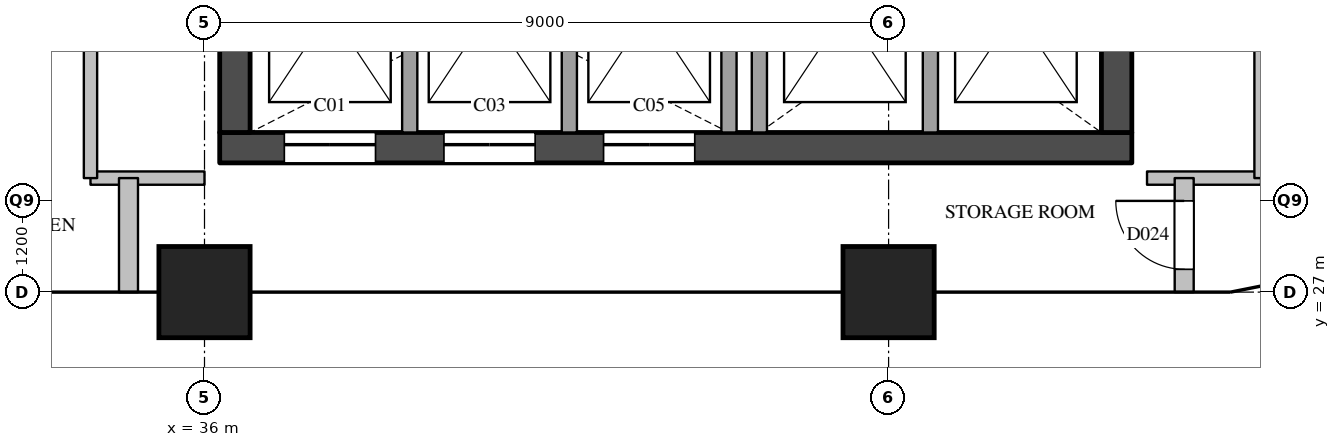
"""IFC4 building model, lengths in metres.
Left out: names, types, materials, properties, quantities, classifications, styles, units other than length and angle.
Written with IfcOpenShell. Run it as: python <this file> out.ifc"""

import sys

from ifc_helpers import new_model, si_unit, direction, frame, frame_2d, origin, origin_2d, place, context, subcontext, project, spatial, rectangle, extrude, element, fill, save


model = new_model("IFC4")
c1 = context("Model", 3, precision=1e-05, world=origin(), true_north=direction((0.0, 1.0)))
c2 = subcontext(c1, "Body", "Model", "MODEL_VIEW")
j1 = project(units=[si_unit("LENGTHUNIT", "METRE"), si_unit("PLANEANGLEUNIT", "RADIAN")], contexts=[c1])
p1 = place(None, origin())
s1 = spatial("IfcSite", under=j1, at=p1, CompositionType="ELEMENT")
p2 = place(p1, origin())
s2 = spatial("IfcBuilding", under=s1, at=p2, CompositionType="ELEMENT")
p3 = place(p2, frame((0.0, 0.0, 238.4)))
s3 = spatial("IfcBuildingStorey", under=s2, at=p3, CompositionType="ELEMENT", Elevation=238.4)
for number, where, z_axis, x_axis in (
    (1, (36.0, 27.0, 0.0), (0.0, 0.0, 1.0), (1.0, 0.0, 0.0)),
    (2, (45.0, 27.0, 0.0), (0.0, 0.0, 1.0), (1.0, 0.0, 0.0)),
):
    element("IfcColumn", number, at=place(p3, frame(where, z_axis=z_axis, x_axis=x_axis)), inside=s3, PredefinedType="COLUMN", context=c2, shape_type="SweptSolid", body=[
        extrude(rectangle(XDim=1.2, YDim=1.2, at=origin_2d()), origin(), (0.0, 0.0, 1.0), 3.9),
    ])
p4 = place(p3, frame((36.2, 28.9, 0.0), z_axis=(0.0, 0.0, 1.0), x_axis=(1.0, 0.0, 0.0)))
e3 = element("IfcWall", 3, at=p4, inside=s3, PredefinedType="SHEAR", context=c2, shape_type="SweptSolid", body=[
    extrude(rectangle(XDim=12.0, YDim=0.4, at=frame_2d((6.0, 0.0))), origin(), (0.0, 0.0, 1.0), 3.6),
])
p5 = place(p4, frame((0.85, 0.0, 0.0)))
e4 = element("IfcOpeningElement", 4, at=p5, cuts=e3, PredefinedType="OPENING", context=c2, shape_type="SweptSolid", body=[
    extrude(rectangle(XDim=1.2, YDim=2.1, at=frame_2d((0.6, 1.05))), frame((0.0, 0.21, 0.0), z_axis=(0.0, -1.0, 0.0), x_axis=(1.0, 0.0, 0.0)), (0.0, 0.0, 1.0), 0.42),
])
p6 = place(p4, frame((2.95, 0.0, 0.0)))
e5 = element("IfcOpeningElement", 5, at=p6, cuts=e3, PredefinedType="OPENING", context=c2, shape_type="SweptSolid", body=[
    extrude(rectangle(XDim=1.2, YDim=2.1, at=frame_2d((0.6, 1.05))), frame((0.0, 0.21, 0.0), z_axis=(0.0, -1.0, 0.0), x_axis=(1.0, 0.0, 0.0)), (0.0, 0.0, 1.0), 0.42),
])
p7 = place(p4, frame((5.05, 0.0, 0.0)))
e6 = element("IfcOpeningElement", 6, at=p7, cuts=e3, PredefinedType="OPENING", context=c2, shape_type="SweptSolid", body=[
    extrude(rectangle(XDim=1.2, YDim=2.1, at=frame_2d((0.6, 1.05))), frame((0.0, 0.21, 0.0), z_axis=(0.0, -1.0, 0.0), x_axis=(1.0, 0.0, 0.0)), (0.0, 0.0, 1.0), 0.42),
])
p8 = place(p3, frame((36.4, 29.1, 0.0), z_axis=(0.0, 0.0, 1.0), x_axis=(0.0, 1.0, 0.0)))
e7 = element("IfcWall", 7, at=p8, inside=s3, PredefinedType="SHEAR", context=c2, shape_type="SweptSolid", body=[
    extrude(rectangle(XDim=20.3, YDim=0.4, at=frame_2d((10.15, 0.0))), origin(), (0.0, 0.0, 1.0), 3.6),
])
p9 = place(p8, frame((3.6, 0.0, 0.0)))
e8 = element("IfcOpeningElement", 8, at=p9, cuts=e7, PredefinedType="OPENING", context=c2, shape_type="SweptSolid", body=[
    extrude(rectangle(XDim=1.8, YDim=2.1, at=frame_2d((0.9, 1.05))), frame((0.0, 0.21, 0.0), z_axis=(0.0, -1.0, 0.0), x_axis=(1.0, 0.0, 0.0)), (0.0, 0.0, 1.0), 0.42),
])
p10 = place(p8, frame((16.4, 0.0, 0.0)))
e9 = element("IfcOpeningElement", 9, at=p10, cuts=e7, PredefinedType="OPENING", context=c2, shape_type="SweptSolid", body=[
    extrude(rectangle(XDim=1.0, YDim=2.1, at=frame_2d((0.5, 1.05))), frame((0.0, 0.21, 0.0), z_axis=(0.0, -1.0, 0.0), x_axis=(1.0, 0.0, 0.0)), (0.0, 0.0, 1.0), 0.42),
])
p11 = place(p3, frame((48.0, 29.1, 0.0), z_axis=(0.0, 0.0, 1.0), x_axis=(0.0, 1.0, 0.0)))
e10 = element("IfcWall", 10, at=p11, inside=s3, PredefinedType="SHEAR", context=c2, shape_type="SweptSolid", body=[
    extrude(rectangle(XDim=20.3, YDim=0.4, at=frame_2d((10.15, 0.0))), origin(), (0.0, 0.0, 1.0), 3.6),
])
p12 = place(p11, frame((12.5, 0.0, 0.0)))
e11 = element("IfcOpeningElement", 11, at=p12, cuts=e10, PredefinedType="OPENING", context=c2, shape_type="SweptSolid", body=[
    extrude(rectangle(XDim=0.7, YDim=2.1, at=frame_2d((0.35, 1.05))), frame((0.0, 0.21, 0.0), z_axis=(0.0, -1.0, 0.0), x_axis=(1.0, 0.0, 0.0)), (0.0, 0.0, 1.0), 0.42),
])
p13 = place(p11, frame((3.9, 0.0, 0.0)))
e12 = element("IfcOpeningElement", 12, at=p13, cuts=e10, PredefinedType="OPENING", context=c2, shape_type="SweptSolid", body=[
    extrude(rectangle(XDim=1.8, YDim=2.1, at=frame_2d((0.9, 1.05))), frame((0.0, 0.21, 0.0), z_axis=(0.0, -1.0, 0.0), x_axis=(1.0, 0.0, 0.0)), (0.0, 0.0, 1.0), 0.42),
])
for number, where, z_axis, x_axis in (
    (13, (38.7, 29.1, 0.0), (0.0, 0.0, 1.0), (0.0, 1.0, 0.0)),
    (14, (40.8, 29.1, 0.0), (0.0, 0.0, 1.0), (0.0, 1.0, 0.0)),
    (15, (42.9, 29.1, 0.0), (0.0, 0.0, 1.0), (0.0, 1.0, 0.0)),
):
    element("IfcWall", number, at=place(p3, frame(where, z_axis=z_axis, x_axis=x_axis)), inside=s3, PredefinedType="SOLIDWALL", context=c2, shape_type="SweptSolid", body=[
        extrude(rectangle(XDim=3.2, YDim=0.2, at=frame_2d((1.6, 0.0))), origin(), (0.0, 0.0, 1.0), 3.6),
    ])
p14 = place(p3, frame((43.3, 29.1, 0.0), z_axis=(0.0, 0.0, 1.0), x_axis=(0.0, 1.0, 0.0)))
e16 = element("IfcWall", 16, at=p14, inside=s3, PredefinedType="SOLIDWALL", context=c2, shape_type="SweptSolid", body=[
    extrude(rectangle(XDim=9.9, YDim=0.2, at=frame_2d((4.95, 0.0))), origin(), (0.0, 0.0, 1.0), 3.6),
])
p15 = place(p3, frame((45.55, 29.1, 0.0), z_axis=(0.0, 0.0, 1.0), x_axis=(0.0, 1.0, 0.0)))
e17 = element("IfcWall", 17, at=p15, inside=s3, PredefinedType="SOLIDWALL", context=c2, shape_type="SweptSolid", body=[
    extrude(rectangle(XDim=3.2, YDim=0.2, at=frame_2d((1.6, 0.0))), origin(), (0.0, 0.0, 1.0), 3.6),
])
for number, where, z_axis, x_axis in (
    (18, (34.5, 28.5, 0.0), (0.0, 0.0, 1.0), (1.0, 0.0, 0.0)),
    (19, (48.4, 28.5, 0.0), (0.0, 0.0, 1.0), (1.0, 0.0, 0.0)),
):
    element("IfcWall", number, at=place(p3, frame(where, z_axis=z_axis, x_axis=x_axis)), inside=s3, PredefinedType="PARTITIONING", context=c2, shape_type="SweptSolid", body=[
        extrude(rectangle(XDim=1.5, YDim=0.175, at=frame_2d((0.75, 0.0))), origin(), (0.0, 0.0, 1.0), 3.6),
    ])
p16 = place(p3, frame((34.5, 28.5, 0.0), z_axis=(0.0, 0.0, 1.0), x_axis=(0.0, 1.0, 0.0)))
e20 = element("IfcWall", 20, at=p16, inside=s3, PredefinedType="PARTITIONING", context=c2, shape_type="SweptSolid", body=[
    extrude(rectangle(XDim=23.0, YDim=0.175, at=frame_2d((11.5, 0.0))), origin(), (0.0, 0.0, 1.0), 3.6),
])
p17 = place(p16, frame((5.1, 0.0, 0.0)))
e21 = element("IfcOpeningElement", 21, at=p17, cuts=e20, PredefinedType="OPENING", context=c2, shape_type="SweptSolid", body=[
    extrude(rectangle(XDim=1.0, YDim=2.1, at=frame_2d((0.5, 1.05))), frame((0.0, 0.097, 0.0), z_axis=(0.0, -1.0, 0.0), x_axis=(1.0, 0.0, 0.0)), (0.0, 0.0, 1.0), 0.195),
])
p18 = place(p16, frame((6.9, 0.0, 0.0)))
e22 = element("IfcOpeningElement", 22, at=p18, cuts=e20, PredefinedType="OPENING", context=c2, shape_type="SweptSolid", body=[
    extrude(rectangle(XDim=1.0, YDim=2.1, at=frame_2d((0.5, 1.05))), frame((0.0, 0.097, 0.0), z_axis=(0.0, -1.0, 0.0), x_axis=(1.0, 0.0, 0.0)), (0.0, 0.0, 1.0), 0.195),
])
p19 = place(p16, frame((16.9, 0.0, 0.0)))
e23 = element("IfcOpeningElement", 23, at=p19, cuts=e20, PredefinedType="OPENING", context=c2, shape_type="SweptSolid", body=[
    extrude(rectangle(XDim=1.0, YDim=2.1, at=frame_2d((0.5, 1.05))), frame((0.0, 0.097, 0.0), z_axis=(0.0, -1.0, 0.0), x_axis=(1.0, 0.0, 0.0)), (0.0, 0.0, 1.0), 0.195),
])
p20 = place(p3, frame((49.9, 28.5, 0.0), z_axis=(0.0, 0.0, 1.0), x_axis=(0.0, 1.0, 0.0)))
e24 = element("IfcWall", 24, at=p20, inside=s3, PredefinedType="PARTITIONING", context=c2, shape_type="SweptSolid", body=[
    extrude(rectangle(XDim=23.0, YDim=0.175, at=frame_2d((11.5, 0.0))), origin(), (0.0, 0.0, 1.0), 3.6),
])
p21 = place(p20, frame((5.3, 0.0, 0.0)))
e25 = element("IfcOpeningElement", 25, at=p21, cuts=e24, PredefinedType="OPENING", context=c2, shape_type="SweptSolid", body=[
    extrude(rectangle(XDim=0.9, YDim=2.1, at=frame_2d((0.45, 1.05))), frame((0.0, 0.097, 0.0), z_axis=(0.0, -1.0, 0.0), x_axis=(1.0, 0.0, 0.0)), (0.0, 0.0, 1.0), 0.195),
])
p22 = place(p20, frame((16.05, 0.0, 0.0)))
e26 = element("IfcOpeningElement", 26, at=p22, cuts=e24, PredefinedType="OPENING", context=c2, shape_type="SweptSolid", body=[
    extrude(rectangle(XDim=0.9, YDim=2.1, at=frame_2d((0.45, 1.05))), frame((0.0, 0.097, 0.0), z_axis=(0.0, -1.0, 0.0), x_axis=(1.0, 0.0, 0.0)), (0.0, 0.0, 1.0), 0.195),
])
p23 = place(p3, frame((35.0, 27.0, 0.0), z_axis=(0.0, 0.0, 1.0), x_axis=(0.0, 1.0, 0.0)))
e27 = element("IfcWall", 27, at=p23, inside=s3, PredefinedType="PARTITIONING", context=c2, shape_type="SweptSolid", body=[
    extrude(rectangle(XDim=1.5, YDim=0.25, at=frame_2d((0.75, 0.0))), origin(), (0.0, 0.0, 1.0), 2.6),
])
p24 = place(p3, frame((48.889, 27.0, 0.0), z_axis=(0.0, 0.0, 1.0), x_axis=(0.0, 1.0, 0.0)))
e28 = element("IfcWall", 28, at=p24, inside=s3, PredefinedType="PARTITIONING", context=c2, shape_type="SweptSolid", body=[
    extrude(rectangle(XDim=1.5, YDim=0.25, at=frame_2d((0.75, 0.0))), origin(), (0.0, 0.0, 1.0), 2.6),
])
p25 = place(p24, frame((0.3, 0.0, 0.0)))
e29 = element("IfcOpeningElement", 29, at=p25, cuts=e28, PredefinedType="OPENING", context=c2, shape_type="SweptSolid", body=[
    extrude(rectangle(XDim=0.9, YDim=2.1, at=frame_2d((0.45, 1.05))), frame((0.0, 0.135, 0.0), z_axis=(0.0, -1.0, 0.0), x_axis=(1.0, 0.0, 0.0)), (0.0, 0.0, 1.0), 0.27),
])
p26 = place(p5, origin())
e30 = element("IfcDoor", 30, at=p26, inside=s3, OperationType="SLIDING_TO_LEFT", PredefinedType="DOOR", context=c2, shape_type="SweptSolid", body=[
    extrude(rectangle(XDim=1.2, YDim=2.1, at=frame_2d((0.6, 1.05))), frame((0.0, 0.025, 0.0), z_axis=(0.0, -1.0, 0.0), x_axis=(1.0, 0.0, 0.0)), (0.0, 0.0, 1.0), 0.05),
])
fill(e4, e30)
p27 = place(p6, origin())
e31 = element("IfcDoor", 31, at=p27, inside=s3, OperationType="SLIDING_TO_LEFT", PredefinedType="DOOR", context=c2, shape_type="SweptSolid", body=[
    extrude(rectangle(XDim=1.2, YDim=2.1, at=frame_2d((0.6, 1.05))), frame((0.0, 0.025, 0.0), z_axis=(0.0, -1.0, 0.0), x_axis=(1.0, 0.0, 0.0)), (0.0, 0.0, 1.0), 0.05),
])
fill(e5, e31)
p28 = place(p7, origin())
e32 = element("IfcDoor", 32, at=p28, inside=s3, OperationType="SLIDING_TO_LEFT", PredefinedType="DOOR", context=c2, shape_type="SweptSolid", body=[
    extrude(rectangle(XDim=1.2, YDim=2.1, at=frame_2d((0.6, 1.05))), frame((0.0, 0.025, 0.0), z_axis=(0.0, -1.0, 0.0), x_axis=(1.0, 0.0, 0.0)), (0.0, 0.0, 1.0), 0.05),
])
fill(e6, e32)
p29 = place(p25, origin())
e33 = element("IfcDoor", 33, at=p29, inside=s3, OperationType="SINGLE_SWING_RIGHT", PredefinedType="DOOR", context=c2, shape_type="SweptSolid", body=[
    extrude(rectangle(XDim=0.9, YDim=2.1, at=frame_2d((0.45, 1.05))), frame((0.0, 0.025, 0.0), z_axis=(0.0, -1.0, 0.0), x_axis=(1.0, 0.0, 0.0)), (0.0, 0.0, 1.0), 0.05),
])
fill(e29, e33)
save(model, sys.argv[1])
